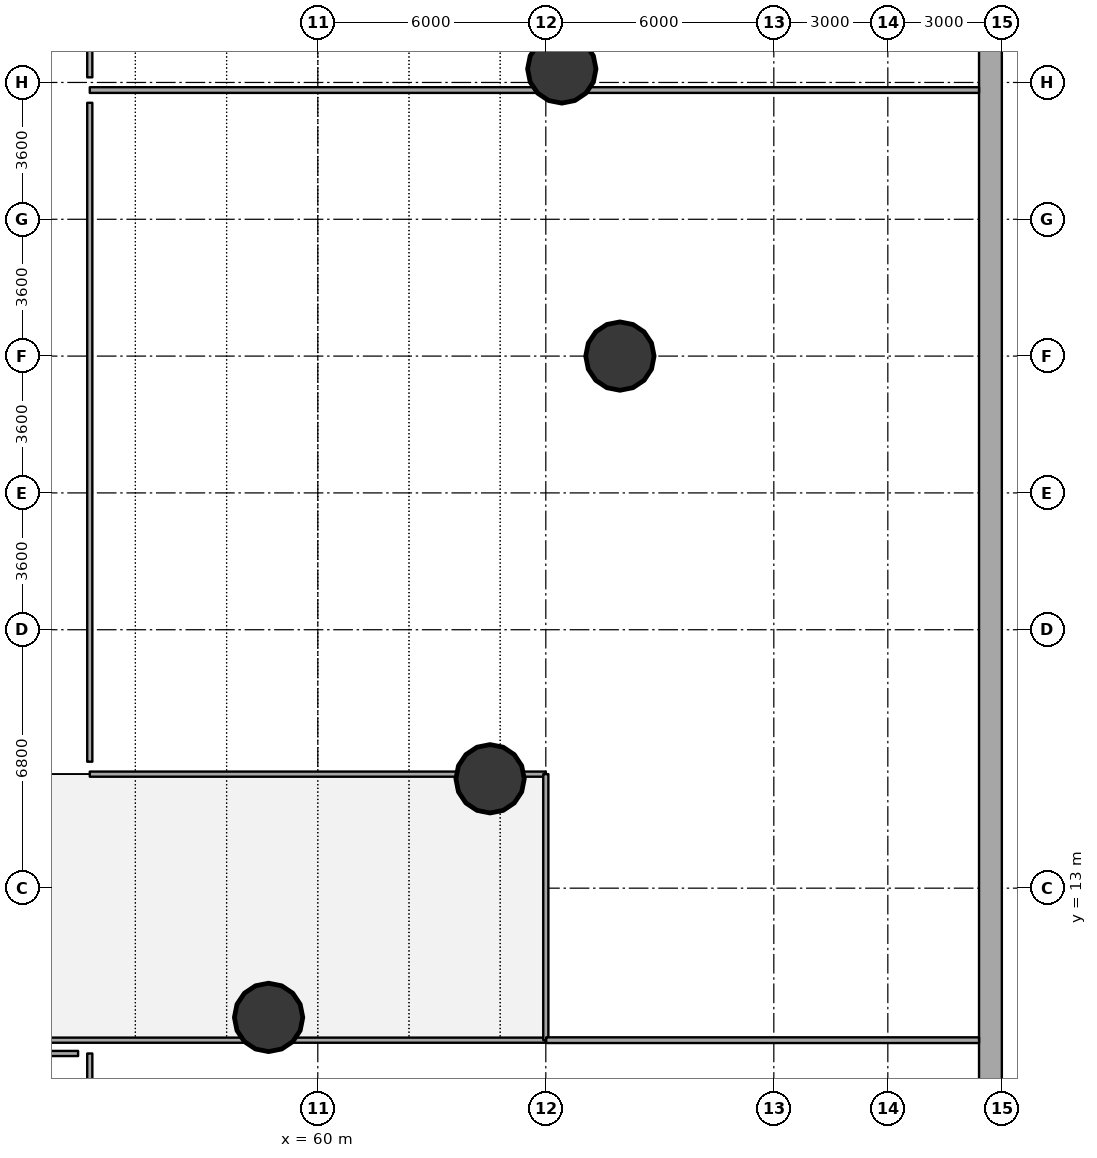
"""IFC4 building model, lengths in metres.
Left out: names, types, materials, properties, quantities, classifications, styles, units other than length and angle.
Written with IfcOpenShell. Run it as: python <this file> out.ifc"""

import sys

from ifc_helpers import new_model, si_unit, direction, frame, frame_2d, origin, origin_2d, place, context, subcontext, project, spatial, rectangle, hollow_circle, extrude, source, transform, mapped, element, fill, save


model = new_model("IFC4")
c1 = context("Model", 3, precision=1e-05, world=origin(), true_north=direction((0.0, 1.0)))
c2 = subcontext(c1, "Body", "Model", "MODEL_VIEW")
j1 = project(units=[si_unit("LENGTHUNIT", "METRE"), si_unit("PLANEANGLEUNIT", "RADIAN")], contexts=[c1])
p1 = place(None, origin())
s1 = spatial("IfcSite", under=j1, at=p1, CompositionType="ELEMENT")
p2 = place(p1, origin())
s2 = spatial("IfcBuilding", under=s1, at=p2, CompositionType="ELEMENT")
p3 = place(p2, frame((0.0, 0.0, -9.0)))
s3 = spatial("IfcBuildingStorey", under=s2, at=p3, CompositionType="ELEMENT", Elevation=-9.0)
p4 = place(p3, frame((77.7, 55.4, 0.0), z_axis=(0.0, 0.0, 1.0), x_axis=(0.0, -1.0, 0.0)))
e1 = element("IfcWall", 1, at=p4, inside=s3, PredefinedType="SHEAR", context=c2, shape_type="SweptSolid", body=[
    extrude(rectangle(XDim=56.8, YDim=0.6, at=frame_2d((28.4, 0.0))), origin(), (0.0, 0.0, 1.0), 4.2),
])
for number, where, z_axis, x_axis in (
    (2, (67.95, 27.0, 0.0), (0.0, 0.0, 1.0), (1.0, 0.0, 0.0)),
    (3, (66.42, 34.555, 0.0), (0.0, 0.0, 1.0), (1.0, 0.0, 0.0)),
    (4, (58.705, 9.599, 0.0), (0.0, 0.0, 1.0), (1.0, 0.0, 0.0)),
    (5, (64.534, 15.878, 0.0), (0.0, 0.0, 1.0), (1.0, 0.0, 0.0)),
):
    element("IfcColumn", number, at=place(p3, frame(where, z_axis=z_axis, x_axis=x_axis)), inside=s3, PredefinedType="COLUMN", context=c2, shape_type="SweptSolid", body=[
        extrude(hollow_circle(Radius=0.9, WallThickness=0.05, at=origin_2d()), origin(), (0.0, 0.0, 1.0), 4.5),
    ])
p5 = place(p3, frame((46.0, 9.0, 0.0), z_axis=(0.0, 0.0, 1.0), x_axis=(1.0, 0.0, 0.0)))
e6 = element("IfcWall", 6, at=p5, inside=s3, PredefinedType="PARTITIONING", context=c2, shape_type="SweptSolid", body=[
    extrude(rectangle(XDim=20.0, YDim=0.135, at=frame_2d((10.0, 0.0))), origin(), (0.0, 0.0, 1.0), 3.385),
])
p6 = place(p5, frame((9.45, 0.0, 0.0)))
e7 = element("IfcOpeningElement", 7, at=p6, cuts=e6, PredefinedType="OPENING", context=c2, shape_type="SweptSolid", body=[
    extrude(rectangle(XDim=1.1, YDim=2.15, at=origin_2d()), frame((0.55, 0.078, 1.075), z_axis=(0.0, -1.0, 0.0), x_axis=(1.0, 0.0, 0.0)), (0.0, 0.0, 1.0), 0.155),
])
p7 = place(p3, frame((54.0, 16.0, 0.0), z_axis=(0.0, 0.0, 1.0), x_axis=(1.0, 0.0, 0.0)))
e8 = element("IfcWall", 8, at=p7, inside=s3, PredefinedType="PARTITIONING", context=c2, shape_type="SweptSolid", body=[
    extrude(rectangle(XDim=12.0, YDim=0.135, at=frame_2d((6.0, 0.0))), origin(), (0.0, 0.0, 1.0), 3.385),
])
p8 = place(p7, frame((5.45, 0.0, 0.0)))
e9 = element("IfcOpeningElement", 9, at=p8, cuts=e8, PredefinedType="OPENING", context=c2, shape_type="SweptSolid", body=[
    extrude(rectangle(XDim=1.1, YDim=2.15, at=origin_2d()), frame((0.55, 0.078, 1.075), z_axis=(0.0, -1.0, 0.0), x_axis=(1.0, 0.0, 0.0)), (0.0, 0.0, 1.0), 0.155),
])
p9 = place(p3, frame((54.0, 34.0, 0.0), z_axis=(0.0, 0.0, 1.0), x_axis=(1.0, 0.0, 0.0)))
e10 = element("IfcWall", 10, at=p9, inside=s3, PredefinedType="PARTITIONING", context=c2, shape_type="SweptSolid", body=[
    extrude(rectangle(XDim=23.4, YDim=0.15, at=frame_2d((11.7, 0.0))), origin(), (0.0, 0.0, 1.0), 3.385),
])
p10 = place(p3, frame((66.0, 9.0, 0.0), z_axis=(0.0, 0.0, 1.0), x_axis=(0.0, 1.0, 0.0)))
e11 = element("IfcWall", 11, at=p10, inside=s3, PredefinedType="PARTITIONING", context=c2, shape_type="SweptSolid", body=[
    extrude(rectangle(XDim=7.0, YDim=0.135, at=frame_2d((3.5, 0.0))), origin(), (0.0, 0.0, 1.0), 3.385),
])
p11 = place(p3, frame((66.01, 9.0, 0.0), z_axis=(0.0, 0.0, 1.0), x_axis=(1.0, 0.0, 0.0)))
e12 = element("IfcWall", 12, at=p11, inside=s3, PredefinedType="PARTITIONING", context=c2, shape_type="SweptSolid", body=[
    extrude(rectangle(XDim=11.39, YDim=0.15, at=frame_2d((5.695, 0.0))), origin(), (0.0, 0.0, 1.0), 4.2),
])
p12 = place(p3, frame((54.0, 2.857, 0.0), z_axis=(0.0, 0.0, 1.0), x_axis=(0.0, 1.0, 0.0)))
e13 = element("IfcWall", 13, at=p12, inside=s3, PredefinedType="PARTITIONING", context=c2, shape_type="SweptSolid", body=[
    extrude(rectangle(XDim=5.792, YDim=0.135, at=frame_2d((2.896, 0.0))), origin(), (0.0, 0.0, 1.0), 4.2),
])
p13 = place(p3, frame((53.692, 8.65, 0.0), z_axis=(0.0, 0.0, 1.0), x_axis=(-1.0, 0.0, 0.0)))
e14 = element("IfcWall", 14, at=p13, inside=s3, PredefinedType="PARTITIONING", context=c2, shape_type="SweptSolid", body=[
    extrude(rectangle(XDim=7.692, YDim=0.135, at=frame_2d((3.846, 0.0))), origin(), (0.0, 0.0, 1.0), 4.2),
])
p14 = place(p3, frame((54.0, 16.327, 0.0), z_axis=(0.0, 0.0, 1.0), x_axis=(0.0, 1.0, 0.0)))
e15 = element("IfcWall", 15, at=p14, inside=s3, PredefinedType="PARTITIONING", context=c2, shape_type="SweptSolid", body=[
    extrude(rectangle(XDim=17.338, YDim=0.135, at=frame_2d((8.669, 0.0))), origin(), (0.0, 0.0, 1.0), 3.385),
])
p15 = place(p3, frame((54.0, 34.335, 0.0), z_axis=(0.0, 0.0, 1.0), x_axis=(0.0, 1.0, 0.0)))
e16 = element("IfcWall", 16, at=p15, inside=s3, PredefinedType="PARTITIONING", context=c2, shape_type="SweptSolid", body=[
    extrude(rectangle(XDim=3.338, YDim=0.135, at=frame_2d((1.669, 0.0))), origin(), (0.0, 0.0, 1.0), 4.2),
])
m1 = source(origin(), c2, "Body", "SweptSolid", [
    extrude(rectangle(XDim=1.1, YDim=2.15, at=origin_2d()), frame((0.55, 0.025, 1.075), z_axis=(0.0, -1.0, 0.0), x_axis=(1.0, 0.0, 0.0)), (0.0, 0.0, 1.0), 0.05),
])
p16 = place(p6, origin())
e17 = element("IfcDoor", 17, at=p16, inside=s3, OperationType="SINGLE_SWING_RIGHT", PredefinedType="DOOR", context=c2, shape_type="MappedRepresentation", body=[
    mapped(m1, transform((0.0, 0.0, 0.0), x_axis=(1.0, 0.0, 0.0), y_axis=(0.0, 1.0, 0.0), z_axis=(0.0, 0.0, 1.0), scale=1.0)),
])
fill(e7, e17)
p17 = place(p8, origin())
e18 = element("IfcDoor", 18, at=p17, inside=s3, OperationType="SINGLE_SWING_LEFT", PredefinedType="DOOR", context=c2, shape_type="MappedRepresentation", body=[
    mapped(m1, transform((0.0, 0.0, 0.0), x_axis=(1.0, 0.0, 0.0), y_axis=(0.0, 1.0, 0.0), z_axis=(0.0, 0.0, 1.0), scale=1.0)),
])
fill(e9, e18)
save(model, sys.argv[1])
